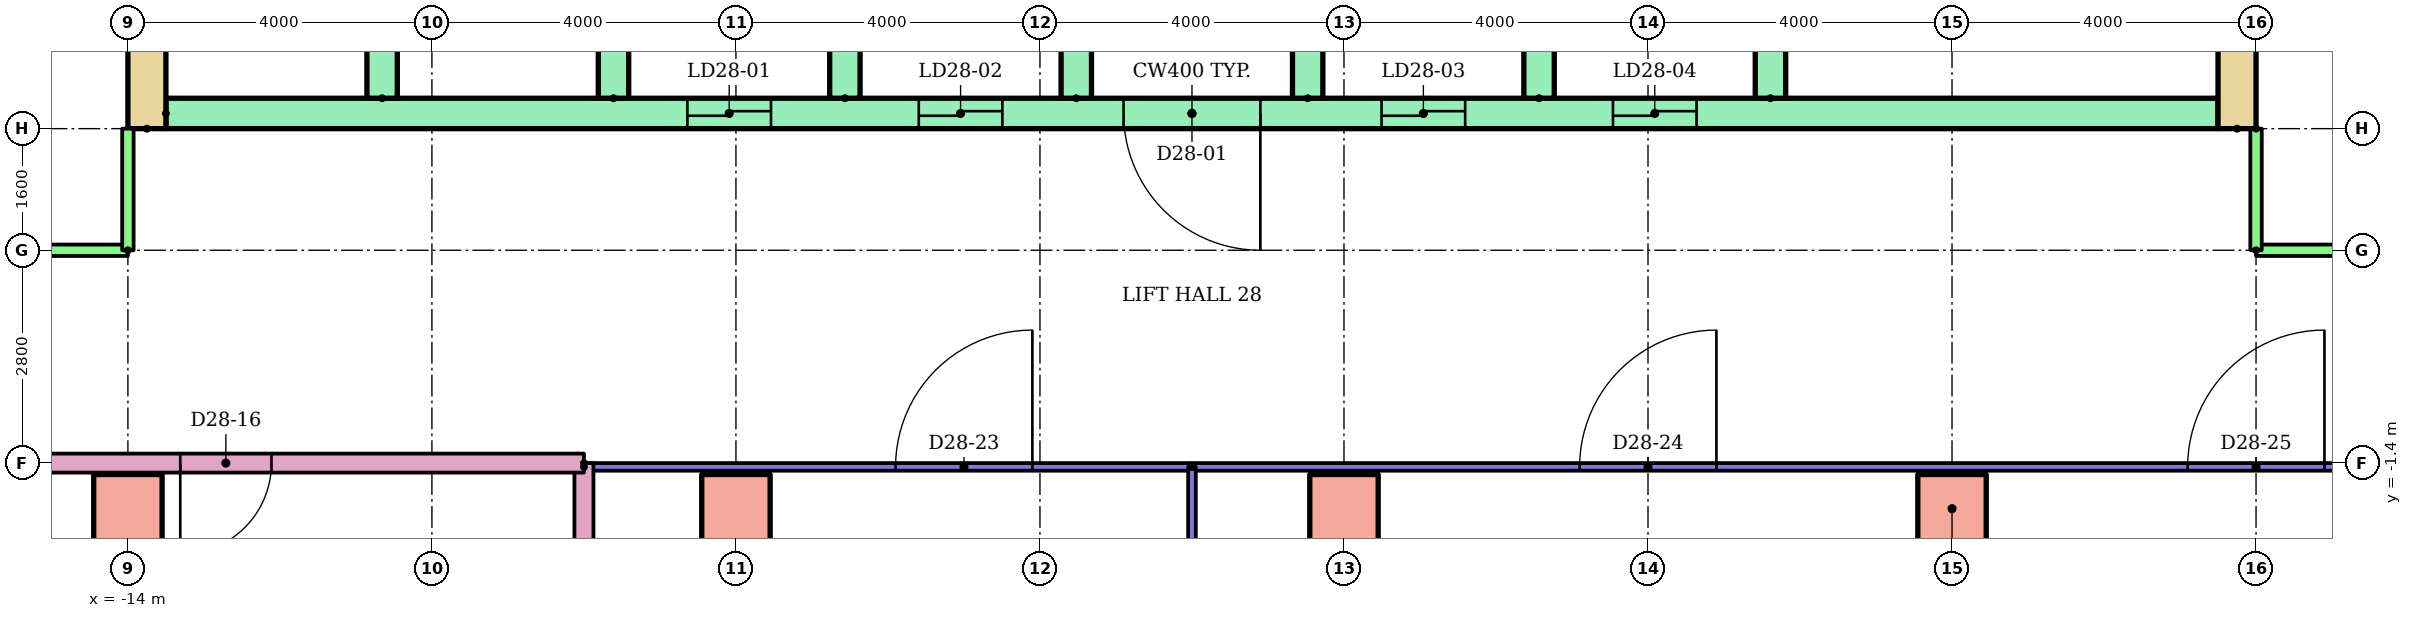
"""IFC4 building model, lengths in metres.
Left out: names, types, materials, properties, quantities, classifications, styles, units other than length and angle.
Written with IfcOpenShell. Run it as: python <this file> out.ifc"""

import sys

from ifc_helpers import new_model, si_unit, direction, frame, frame_2d, origin, origin_2d, place, context, subcontext, project, spatial, rectangle, extrude, element, fill, save


model = new_model("IFC4")
c1 = context("Model", 3, precision=1e-05, world=origin(), true_north=direction((0.0, 1.0)))
c2 = subcontext(c1, "Body", "Model", "MODEL_VIEW")
j1 = project(units=[si_unit("LENGTHUNIT", "METRE"), si_unit("PLANEANGLEUNIT", "RADIAN")], contexts=[c1])
p1 = place(None, origin())
s1 = spatial("IfcSite", under=j1, at=p1, CompositionType="ELEMENT")
p2 = place(p1, origin())
s2 = spatial("IfcBuilding", under=s1, at=p2, CompositionType="ELEMENT")
p3 = place(p2, frame((0.0, 0.0, 106.3)))
s3 = spatial("IfcBuildingStorey", under=s2, at=p3, CompositionType="ELEMENT", Elevation=106.3)
for number, where in (
    (1, (-14.0, -2.0, 0.0)),
    (2, (-6.0, -2.0, 0.0)),
    (3, (2.0, -2.0, 0.0)),
    (4, (10.0, -2.0, 0.0)),
):
    element("IfcColumn", number, at=place(p3, frame(where)), inside=s3, PredefinedType="COLUMN", context=c2, shape_type="SweptSolid", body=[
        extrude(rectangle(XDim=0.9, YDim=0.9, at=origin_2d()), origin(), (0.0, 0.0, 1.0), 9.6),
    ])
for number, where, z_axis, x_axis in (
    (5, (-13.75, 3.0, 0.0), (0.0, 0.0, 1.0), (0.0, 1.0, 0.0)),
    (6, (13.75, 3.0, 0.0), (0.0, 0.0, 1.0), (0.0, 1.0, 0.0)),
):
    element("IfcWall", number, at=place(p3, frame(where, z_axis=z_axis, x_axis=x_axis)), inside=s3, PredefinedType="SHEAR", context=c2, shape_type="SweptSolid", body=[
        extrude(rectangle(XDim=17.0, YDim=0.5, at=frame_2d((8.5, 0.0))), origin(), (0.0, 0.0, 1.0), 8.8),
    ])
p4 = place(p3, frame((-13.5, 3.2, 0.0)))
e7 = element("IfcWall", 7, at=p4, inside=s3, PredefinedType="SHEAR", context=c2, shape_type="SweptSolid", body=[
    extrude(rectangle(XDim=27.0, YDim=0.4, at=frame_2d((13.5, 0.0))), origin(), (0.0, 0.0, 1.0), 8.8),
])
p5 = place(p4, frame((6.861, 0.0, 0.0)))
e8 = element("IfcOpeningElement", 8, at=p5, cuts=e7, PredefinedType="OPENING", context=c2, shape_type="SweptSolid", body=[
    extrude(rectangle(XDim=1.1, YDim=2.1, at=frame_2d((0.55, 1.05))), frame((0.0, 0.21, 0.0), z_axis=(0.0, -1.0, 0.0), x_axis=(1.0, 0.0, 0.0)), (0.0, 0.0, 1.0), 0.42),
])
p6 = place(p4, frame((9.906, 0.0, 0.0)))
e9 = element("IfcOpeningElement", 9, at=p6, cuts=e7, PredefinedType="OPENING", context=c2, shape_type="SweptSolid", body=[
    extrude(rectangle(XDim=1.1, YDim=2.1, at=frame_2d((0.55, 1.05))), frame((0.0, 0.21, 0.0), z_axis=(0.0, -1.0, 0.0), x_axis=(1.0, 0.0, 0.0)), (0.0, 0.0, 1.0), 0.42),
])
p7 = place(p4, frame((15.994, 0.0, 0.0)))
e10 = element("IfcOpeningElement", 10, at=p7, cuts=e7, PredefinedType="OPENING", context=c2, shape_type="SweptSolid", body=[
    extrude(rectangle(XDim=1.1, YDim=2.1, at=frame_2d((0.55, 1.05))), frame((0.0, 0.21, 0.0), z_axis=(0.0, -1.0, 0.0), x_axis=(1.0, 0.0, 0.0)), (0.0, 0.0, 1.0), 0.42),
])
p8 = place(p4, frame((19.039, 0.0, 0.0)))
e11 = element("IfcOpeningElement", 11, at=p8, cuts=e7, PredefinedType="OPENING", context=c2, shape_type="SweptSolid", body=[
    extrude(rectangle(XDim=1.1, YDim=2.1, at=frame_2d((0.55, 1.05))), frame((0.0, 0.21, 0.0), z_axis=(0.0, -1.0, 0.0), x_axis=(1.0, 0.0, 0.0)), (0.0, 0.0, 1.0), 0.42),
])
p9 = place(p4, frame((12.6, 0.0, 0.0)))
e12 = element("IfcOpeningElement", 12, at=p9, cuts=e7, PredefinedType="OPENING", context=c2, shape_type="SweptSolid", body=[
    extrude(rectangle(XDim=1.8, YDim=2.1, at=frame_2d((0.9, 1.05))), frame((0.0, 0.21, 0.0), z_axis=(0.0, -1.0, 0.0), x_axis=(1.0, 0.0, 0.0)), (0.0, 0.0, 1.0), 0.42),
])
for number, where, z_axis, x_axis in (
    (13, (-10.656, 3.4, 0.0), (0.0, 0.0, 1.0), (0.0, 1.0, 0.0)),
    (14, (-7.611, 3.4, 0.0), (0.0, 0.0, 1.0), (0.0, 1.0, 0.0)),
    (15, (-4.567, 3.4, 0.0), (0.0, 0.0, 1.0), (0.0, 1.0, 0.0)),
    (16, (-1.522, 3.4, 0.0), (0.0, 0.0, 1.0), (0.0, 1.0, 0.0)),
    (17, (1.522, 3.4, 0.0), (0.0, 0.0, 1.0), (0.0, 1.0, 0.0)),
    (18, (4.567, 3.4, 0.0), (0.0, 0.0, 1.0), (0.0, 1.0, 0.0)),
    (19, (7.611, 3.4, 0.0), (0.0, 0.0, 1.0), (0.0, 1.0, 0.0)),
):
    element("IfcWall", number, at=place(p3, frame(where, z_axis=z_axis, x_axis=x_axis)), inside=s3, PredefinedType="SHEAR", context=c2, shape_type="SweptSolid", body=[
        extrude(rectangle(XDim=3.0, YDim=0.4, at=frame_2d((1.5, 0.0))), origin(), (0.0, 0.0, 1.0), 8.8),
    ])
p10 = place(p3, frame((-8.0, -11.4, 0.0), z_axis=(0.0, 0.0, 1.0), x_axis=(0.0, 1.0, 0.0)))
e20 = element("IfcWall", 20, at=p10, inside=s3, PredefinedType="PARTITIONING", context=c2, shape_type="SweptSolid", body=[
    extrude(rectangle(XDim=10.0, YDim=0.25, at=frame_2d((5.0, 0.0))), origin(), (0.0, 0.0, 1.0), 8.8),
])
p11 = place(p3, frame((-8.0, -1.4, 0.0), z_axis=(0.0, 0.0, 1.0), x_axis=(-1.0, 0.0, 0.0)))
e21 = element("IfcWall", 21, at=p11, inside=s3, PredefinedType="PARTITIONING", context=c2, shape_type="SweptSolid", body=[
    extrude(rectangle(XDim=12.0, YDim=0.25, at=frame_2d((6.0, 0.0))), origin(), (0.0, 0.0, 1.0), 8.8),
])
p12 = place(p11, frame((10.7, 0.0, 0.0)))
e22 = element("IfcOpeningElement", 22, at=p12, cuts=e21, PredefinedType="OPENING", context=c2, shape_type="SweptSolid", body=[
    extrude(rectangle(XDim=1.0, YDim=2.1, at=frame_2d((0.5, 1.05))), frame((0.0, 0.135, 0.0), z_axis=(0.0, -1.0, 0.0), x_axis=(1.0, 0.0, 0.0)), (0.0, 0.0, 1.0), 0.27),
])
p13 = place(p11, frame((4.111, 0.0, 0.0)))
e23 = element("IfcOpeningElement", 23, at=p13, cuts=e21, PredefinedType="OPENING", context=c2, shape_type="SweptSolid", body=[
    extrude(rectangle(XDim=1.2, YDim=2.1, at=frame_2d((0.6, 1.05))), frame((0.0, 0.135, 0.0), z_axis=(0.0, -1.0, 0.0), x_axis=(1.0, 0.0, 0.0)), (0.0, 0.0, 1.0), 0.27),
])
p14 = place(p3, frame((-22.0, 1.4, 0.0)))
e24 = element("IfcWall", 24, at=p14, inside=s3, PredefinedType="PARTITIONING", context=c2, shape_type="SweptSolid", body=[
    extrude(rectangle(XDim=8.0, YDim=0.15, at=frame_2d((4.0, 0.0))), origin(), (0.0, 0.0, 1.0), 8.8),
])
p15 = place(p14, frame((3.4, 0.0, 0.0)))
e25 = element("IfcOpeningElement", 25, at=p15, cuts=e24, PredefinedType="OPENING", context=c2, shape_type="SweptSolid", body=[
    extrude(rectangle(XDim=1.2, YDim=2.1, at=frame_2d((0.6, 1.05))), frame((0.0, 0.085, 0.0), z_axis=(0.0, -1.0, 0.0), x_axis=(1.0, 0.0, 0.0)), (0.0, 0.0, 1.0), 0.17),
])
p16 = place(p3, frame((-14.0, 1.4, 0.0), z_axis=(0.0, 0.0, 1.0), x_axis=(0.0, 1.0, 0.0)))
e26 = element("IfcWall", 26, at=p16, inside=s3, PredefinedType="PARTITIONING", context=c2, shape_type="SweptSolid", body=[
    extrude(rectangle(XDim=1.6, YDim=0.15, at=frame_2d((0.8, 0.0))), origin(), (0.0, 0.0, 1.0), 8.8),
])
p17 = place(p3, frame((14.0, 1.4, 0.0)))
e27 = element("IfcWall", 27, at=p17, inside=s3, PredefinedType="PARTITIONING", context=c2, shape_type="SweptSolid", body=[
    extrude(rectangle(XDim=8.0, YDim=0.15, at=frame_2d((4.0, 0.0))), origin(), (0.0, 0.0, 1.0), 8.8),
])
p18 = place(p17, frame((4.689, 0.0, 0.0)))
e28 = element("IfcOpeningElement", 28, at=p18, cuts=e27, PredefinedType="OPENING", context=c2, shape_type="SweptSolid", body=[
    extrude(rectangle(XDim=1.2, YDim=2.1, at=frame_2d((0.6, 1.05))), frame((0.0, 0.085, 0.0), z_axis=(0.0, -1.0, 0.0), x_axis=(1.0, 0.0, 0.0)), (0.0, 0.0, 1.0), 0.17),
])
p19 = place(p3, frame((14.0, 3.0, 0.0), z_axis=(0.0, 0.0, 1.0), x_axis=(0.0, -1.0, 0.0)))
e29 = element("IfcWall", 29, at=p19, inside=s3, PredefinedType="PARTITIONING", context=c2, shape_type="SweptSolid", body=[
    extrude(rectangle(XDim=1.6, YDim=0.15, at=frame_2d((0.8, 0.0))), origin(), (0.0, 0.0, 1.0), 8.8),
])
p20 = place(p3, frame((-8.0, -1.45, 0.0)))
e30 = element("IfcWall", 30, at=p20, inside=s3, PredefinedType="PARTITIONING", context=c2, shape_type="SweptSolid", body=[
    extrude(rectangle(XDim=8.0, YDim=0.1, at=frame_2d((4.0, 0.0))), origin(), (0.0, 0.0, 1.0), 8.8),
])
p21 = place(p20, frame((4.1, 0.0, 0.0)))
e31 = element("IfcOpeningElement", 31, at=p21, cuts=e30, PredefinedType="OPENING", context=c2, shape_type="SweptSolid", body=[
    extrude(rectangle(XDim=1.8, YDim=2.1, at=frame_2d((0.9, 1.05))), frame((0.0, 0.06, 0.0), z_axis=(0.0, -1.0, 0.0), x_axis=(1.0, 0.0, 0.0)), (0.0, 0.0, 1.0), 0.12),
])
p22 = place(p3, frame((0.0, -1.45, 0.0)))
e32 = element("IfcWall", 32, at=p22, inside=s3, PredefinedType="PARTITIONING", context=c2, shape_type="SweptSolid", body=[
    extrude(rectangle(XDim=22.0, YDim=0.1, at=frame_2d((11.0, 0.0))), origin(), (0.0, 0.0, 1.0), 8.8),
])
p23 = place(p22, frame((5.1, 0.0, 0.0)))
e33 = element("IfcOpeningElement", 33, at=p23, cuts=e32, PredefinedType="OPENING", context=c2, shape_type="SweptSolid", body=[
    extrude(rectangle(XDim=1.8, YDim=2.1, at=frame_2d((0.9, 1.05))), frame((0.0, 0.06, 0.0), z_axis=(0.0, -1.0, 0.0), x_axis=(1.0, 0.0, 0.0)), (0.0, 0.0, 1.0), 0.12),
])
p24 = place(p22, frame((13.1, 0.0, 0.0)))
e34 = element("IfcOpeningElement", 34, at=p24, cuts=e32, PredefinedType="OPENING", context=c2, shape_type="SweptSolid", body=[
    extrude(rectangle(XDim=1.8, YDim=2.1, at=frame_2d((0.9, 1.05))), frame((0.0, 0.06, 0.0), z_axis=(0.0, -1.0, 0.0), x_axis=(1.0, 0.0, 0.0)), (0.0, 0.0, 1.0), 0.12),
])
p25 = place(p3, frame((0.0, -1.45, 0.0), z_axis=(0.0, 0.0, 1.0), x_axis=(0.0, -1.0, 0.0)))
e35 = element("IfcWall", 35, at=p25, inside=s3, PredefinedType="PARTITIONING", context=c2, shape_type="SweptSolid", body=[
    extrude(rectangle(XDim=14.45, YDim=0.1, at=frame_2d((7.225, 0.0))), origin(), (0.0, 0.0, 1.0), 8.8),
])
p26 = place(p5, origin())
e36 = element("IfcDoor", 36, at=p26, inside=s3, OperationType="SLIDING_TO_LEFT", PredefinedType="DOOR", context=c2, shape_type="SweptSolid", body=[
    extrude(rectangle(XDim=1.1, YDim=2.1, at=frame_2d((0.55, 1.05))), frame((0.0, 0.025, 0.0), z_axis=(0.0, -1.0, 0.0), x_axis=(1.0, 0.0, 0.0)), (0.0, 0.0, 1.0), 0.05),
])
fill(e8, e36)
p27 = place(p6, origin())
e37 = element("IfcDoor", 37, at=p27, inside=s3, OperationType="SLIDING_TO_LEFT", PredefinedType="DOOR", context=c2, shape_type="SweptSolid", body=[
    extrude(rectangle(XDim=1.1, YDim=2.1, at=frame_2d((0.55, 1.05))), frame((0.0, 0.025, 0.0), z_axis=(0.0, -1.0, 0.0), x_axis=(1.0, 0.0, 0.0)), (0.0, 0.0, 1.0), 0.05),
])
fill(e9, e37)
p28 = place(p7, origin())
e38 = element("IfcDoor", 38, at=p28, inside=s3, OperationType="SLIDING_TO_LEFT", PredefinedType="DOOR", context=c2, shape_type="SweptSolid", body=[
    extrude(rectangle(XDim=1.1, YDim=2.1, at=frame_2d((0.55, 1.05))), frame((0.0, 0.025, 0.0), z_axis=(0.0, -1.0, 0.0), x_axis=(1.0, 0.0, 0.0)), (0.0, 0.0, 1.0), 0.05),
])
fill(e10, e38)
p29 = place(p8, origin())
e39 = element("IfcDoor", 39, at=p29, inside=s3, OperationType="SLIDING_TO_LEFT", PredefinedType="DOOR", context=c2, shape_type="SweptSolid", body=[
    extrude(rectangle(XDim=1.1, YDim=2.1, at=frame_2d((0.55, 1.05))), frame((0.0, 0.025, 0.0), z_axis=(0.0, -1.0, 0.0), x_axis=(1.0, 0.0, 0.0)), (0.0, 0.0, 1.0), 0.05),
])
fill(e11, e39)
p30 = place(p9, frame((1.8, 0.0, 0.0), z_axis=(0.0, 0.0, 1.0), x_axis=(-1.0, 0.0, 0.0)))
e40 = element("IfcDoor", 40, at=p30, inside=s3, OperationType="DOUBLE_DOOR_SINGLE_SWING", PredefinedType="DOOR", context=c2, shape_type="SweptSolid", body=[
    extrude(rectangle(XDim=1.8, YDim=2.1, at=frame_2d((0.9, 1.05))), frame((0.0, 0.025, 0.0), z_axis=(0.0, -1.0, 0.0), x_axis=(1.0, 0.0, 0.0)), (0.0, 0.0, 1.0), 0.05),
])
fill(e12, e40)
p31 = place(p13, origin())
e41 = element("IfcDoor", 41, at=p31, inside=s3, OperationType="SINGLE_SWING_RIGHT", PredefinedType="DOOR", context=c2, shape_type="SweptSolid", body=[
    extrude(rectangle(XDim=1.2, YDim=2.1, at=frame_2d((0.6, 1.05))), frame((0.0, 0.025, 0.0), z_axis=(0.0, -1.0, 0.0), x_axis=(1.0, 0.0, 0.0)), (0.0, 0.0, 1.0), 0.05),
])
fill(e23, e41)
p32 = place(p21, origin())
e42 = element("IfcDoor", 42, at=p32, inside=s3, OperationType="DOUBLE_DOOR_SINGLE_SWING", PredefinedType="DOOR", context=c2, shape_type="SweptSolid", body=[
    extrude(rectangle(XDim=1.8, YDim=2.1, at=frame_2d((0.9, 1.05))), frame((0.0, 0.025, 0.0), z_axis=(0.0, -1.0, 0.0), x_axis=(1.0, 0.0, 0.0)), (0.0, 0.0, 1.0), 0.05),
])
fill(e31, e42)
p33 = place(p23, origin())
e43 = element("IfcDoor", 43, at=p33, inside=s3, OperationType="DOUBLE_DOOR_SINGLE_SWING", PredefinedType="DOOR", context=c2, shape_type="SweptSolid", body=[
    extrude(rectangle(XDim=1.8, YDim=2.1, at=frame_2d((0.9, 1.05))), frame((0.0, 0.025, 0.0), z_axis=(0.0, -1.0, 0.0), x_axis=(1.0, 0.0, 0.0)), (0.0, 0.0, 1.0), 0.05),
])
fill(e33, e43)
p34 = place(p24, origin())
e44 = element("IfcDoor", 44, at=p34, inside=s3, OperationType="DOUBLE_DOOR_SINGLE_SWING", PredefinedType="DOOR", context=c2, shape_type="SweptSolid", body=[
    extrude(rectangle(XDim=1.8, YDim=2.1, at=frame_2d((0.9, 1.05))), frame((0.0, 0.025, 0.0), z_axis=(0.0, -1.0, 0.0), x_axis=(1.0, 0.0, 0.0)), (0.0, 0.0, 1.0), 0.05),
])
fill(e34, e44)
save(model, sys.argv[1])
